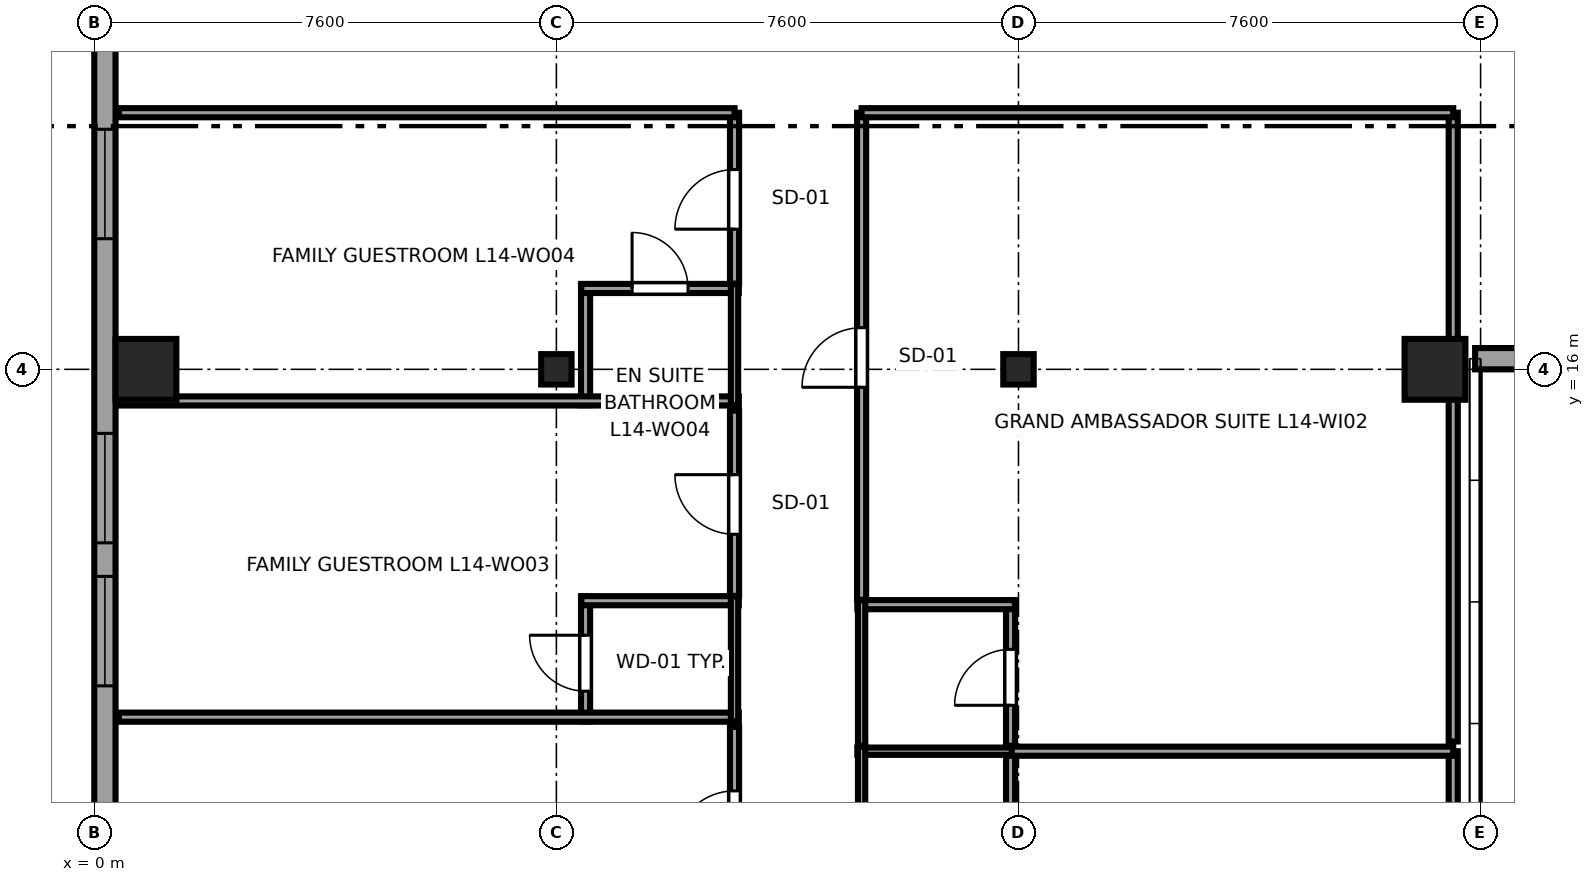
"""IFC4 building model, lengths in metres.
Left out: names, types, materials, properties, quantities, classifications, styles, units other than length and angle.
Written with IfcOpenShell. Run it as: python <this file> out.ifc"""

import sys

from ifc_helpers import new_model, si_unit, direction, frame, frame_2d, origin, origin_2d, place, context, subcontext, project, spatial, rectangle, i_section, extrude, source, transform, mapped, element, fill, save


model = new_model("IFC4")
c1 = context("Model", 3, precision=1e-05, world=origin(), true_north=direction((0.0, 1.0)))
c2 = subcontext(c1, "Body", "Model", "MODEL_VIEW")
j1 = project(units=[si_unit("LENGTHUNIT", "METRE"), si_unit("PLANEANGLEUNIT", "RADIAN")], contexts=[c1])
p1 = place(None, origin())
s1 = spatial("IfcSite", under=j1, at=p1, CompositionType="ELEMENT")
p2 = place(p1, origin())
s2 = spatial("IfcBuilding", under=s1, at=p2, CompositionType="ELEMENT")
p3 = place(p2, frame((0.0, 0.0, 60.4)))
s3 = spatial("IfcBuildingStorey", under=s2, at=p3, CompositionType="ELEMENT", Elevation=60.4)
m1 = source(origin(), c2, "Body", "SweptSolid", [
    extrude(rectangle(XDim=1.0, YDim=1.0, at=origin_2d()), origin(), (0.0, 0.0, 1.0), 3.55),
])
p4 = place(p3, frame((0.85, 16.0, 0.0), z_axis=(0.0, 0.0, 1.0), x_axis=(1.0, 0.0, 0.0)))
e1 = element("IfcColumn", 1, at=p4, inside=s3, PredefinedType="COLUMN", context=c2, shape_type="MappedRepresentation", body=[
    mapped(m1, transform((0.0, 0.0, 0.0), x_axis=(1.0, 0.0, 0.0), y_axis=(0.0, 1.0, 0.0), z_axis=(0.0, 0.0, 1.0), scale=1.0)),
])
m2 = source(origin(), c2, "Body", "SweptSolid", [
    extrude(i_section(OverallWidth=0.5, OverallDepth=0.5, WebThickness=0.028, FlangeThickness=0.045, at=origin_2d()), origin(), (0.0, 0.0, 1.0), 3.55),
])
for number, where, z_axis, x_axis in (
    (2, (7.6, 16.0, 0.0), (0.0, 0.0, 1.0), (1.0, 0.0, 0.0)),
    (3, (15.2, 16.0, 0.0), (0.0, 0.0, 1.0), (1.0, 0.0, 0.0)),
):
    element("IfcColumn", number, at=place(p3, frame(where, z_axis=z_axis, x_axis=x_axis)), inside=s3, PredefinedType="COLUMN", context=c2, shape_type="MappedRepresentation", body=[
        mapped(m2, transform((0.0, 0.0, 0.0), x_axis=(1.0, 0.0, 0.0), y_axis=(0.0, 1.0, 0.0), z_axis=(0.0, 0.0, 1.0), scale=1.0)),
    ])
p5 = place(p3, frame((22.05, 16.0, 0.0), z_axis=(0.0, 0.0, 1.0), x_axis=(1.0, 0.0, 0.0)))
e4 = element("IfcColumn", 4, at=p5, inside=s3, PredefinedType="COLUMN", context=c2, shape_type="MappedRepresentation", body=[
    mapped(m1, transform((0.0, 0.0, 0.0), x_axis=(1.0, 0.0, 0.0), y_axis=(0.0, 1.0, 0.0), z_axis=(0.0, 0.0, 1.0), scale=1.0)),
])
p6 = place(p3, frame((22.71, 16.175, 0.0), z_axis=(0.0, 0.0, 1.0), x_axis=(1.0, 0.0, 0.0)))
e5 = element("IfcWall", 5, at=p6, inside=s3, PredefinedType="SOLIDWALL", context=c2, shape_type="SweptSolid", body=[
    extrude(rectangle(XDim=11.58, YDim=0.35, at=frame_2d((5.79, 0.0))), origin(), (0.0, 0.0, 1.0), 2.748),
])
p7 = place(p6, frame((2.295, 0.0, 0.68)))
e6 = element("IfcOpeningElement", 6, at=p7, cuts=e5, PredefinedType="OPENING", context=c2, shape_type="SweptSolid", body=[
    extrude(rectangle(XDim=1.8, YDim=1.85, at=frame_2d((0.9, 0.925))), frame((0.0, 0.185, 0.0), z_axis=(0.0, -1.0, 0.0), x_axis=(1.0, 0.0, 0.0)), (0.0, 0.0, 1.0), 0.37),
])
p8 = place(p6, frame((7.485, 0.0, 0.68)))
e7 = element("IfcOpeningElement", 7, at=p8, cuts=e5, PredefinedType="OPENING", context=c2, shape_type="SweptSolid", body=[
    extrude(rectangle(XDim=1.8, YDim=1.85, at=frame_2d((0.9, 0.925))), frame((0.0, 0.185, 0.0), z_axis=(0.0, -1.0, 0.0), x_axis=(1.0, 0.0, 0.0)), (0.0, 0.0, 1.0), 0.37),
])
p9 = place(p3, frame((0.175, 41.383, 0.0), z_axis=(0.0, 0.0, 1.0), x_axis=(0.0, -1.0, 0.0)))
e8 = element("IfcWall", 8, at=p9, inside=s3, PredefinedType="SOLIDWALL", context=c2, shape_type="SweptSolid", body=[
    extrude(rectangle(XDim=36.766, YDim=0.35, at=frame_2d((18.383, 0.0))), origin(), (0.0, 0.0, 1.0), 3.37),
])
p10 = place(p9, frame((1.676, 0.0, 0.68)))
e9 = element("IfcOpeningElement", 9, at=p10, cuts=e8, PredefinedType="OPENING", context=c2, shape_type="SweptSolid", body=[
    extrude(rectangle(XDim=1.8, YDim=1.85, at=frame_2d((0.9, 0.925))), frame((0.0, 0.185, 0.0), z_axis=(0.0, -1.0, 0.0), x_axis=(1.0, 0.0, 0.0)), (0.0, 0.0, 1.0), 0.37),
])
p11 = place(p9, frame((4.578, 0.0, 0.68)))
e10 = element("IfcOpeningElement", 10, at=p11, cuts=e8, PredefinedType="OPENING", context=c2, shape_type="SweptSolid", body=[
    extrude(rectangle(XDim=1.8, YDim=1.85, at=frame_2d((0.9, 0.925))), frame((0.0, 0.185, 0.0), z_axis=(0.0, -1.0, 0.0), x_axis=(1.0, 0.0, 0.0)), (0.0, 0.0, 1.0), 0.37),
])
p12 = place(p9, frame((21.435, 0.0, 0.68)))
e11 = element("IfcOpeningElement", 11, at=p12, cuts=e8, PredefinedType="OPENING", context=c2, shape_type="SweptSolid", body=[
    extrude(rectangle(XDim=1.8, YDim=1.85, at=frame_2d((0.9, 0.925))), frame((0.0, 0.185, 0.0), z_axis=(0.0, -1.0, 0.0), x_axis=(1.0, 0.0, 0.0)), (0.0, 0.0, 1.0), 0.37),
])
p13 = place(p9, frame((26.436, 0.0, 0.68)))
e12 = element("IfcOpeningElement", 12, at=p13, cuts=e8, PredefinedType="OPENING", context=c2, shape_type="SweptSolid", body=[
    extrude(rectangle(XDim=1.8, YDim=1.85, at=frame_2d((0.9, 0.925))), frame((0.0, 0.185, 0.0), z_axis=(0.0, -1.0, 0.0), x_axis=(1.0, 0.0, 0.0)), (0.0, 0.0, 1.0), 0.37),
])
p14 = place(p9, frame((28.788, 0.0, 0.68)))
e13 = element("IfcOpeningElement", 13, at=p14, cuts=e8, PredefinedType="OPENING", context=c2, shape_type="SweptSolid", body=[
    extrude(rectangle(XDim=1.8, YDim=1.85, at=frame_2d((0.9, 0.925))), frame((0.0, 0.185, 0.0), z_axis=(0.0, -1.0, 0.0), x_axis=(1.0, 0.0, 0.0)), (0.0, 0.0, 1.0), 0.37),
])
p15 = place(p9, frame((33.893, 0.0, 0.62)))
e14 = element("IfcOpeningElement", 14, at=p15, cuts=e8, PredefinedType="OPENING", context=c2, shape_type="SweptSolid", body=[
    extrude(rectangle(XDim=1.5, YDim=1.55, at=frame_2d((0.75, 0.775))), frame((0.0, 0.185, 0.0), z_axis=(0.0, -1.0, 0.0), x_axis=(1.0, 0.0, 0.0)), (0.0, 0.0, 1.0), 0.37),
])
p16 = place(p9, frame((14.643, 0.0, 0.62)))
e15 = element("IfcOpeningElement", 15, at=p16, cuts=e8, PredefinedType="OPENING", context=c2, shape_type="SweptSolid", body=[
    extrude(rectangle(XDim=1.5, YDim=1.55, at=frame_2d((0.75, 0.775))), frame((0.0, 0.185, 0.0), z_axis=(0.0, -1.0, 0.0), x_axis=(1.0, 0.0, 0.0)), (0.0, 0.0, 1.0), 0.37),
])
p17 = place(p3, frame((8.08, 10.21, 0.0), z_axis=(0.0, 0.0, 1.0), x_axis=(0.0, 1.0, 0.0)))
e16 = element("IfcWall", 16, at=p17, inside=s3, PredefinedType="PARTITIONING", context=c2, shape_type="SweptSolid", body=[
    extrude(rectangle(XDim=2.055, YDim=0.15, at=frame_2d((1.027, 0.0))), origin(), (0.0, 0.0, 1.0), 3.37),
])
p18 = place(p17, frame((0.498, 0.0, 0.0)))
e17 = element("IfcOpeningElement", 17, at=p18, cuts=e16, PredefinedType="OPENING", context=c2, shape_type="SweptSolid", body=[
    extrude(rectangle(XDim=0.92, YDim=2.01, at=frame_2d((0.46, 1.005))), frame((0.0, 0.085, 0.0), z_axis=(0.0, -1.0, 0.0), x_axis=(1.0, 0.0, 0.0)), (0.0, 0.0, 1.0), 0.17),
])
p19 = place(p3, frame((0.405, 10.28, 0.0), z_axis=(0.0, 0.0, 1.0), x_axis=(1.0, 0.0, 0.0)))
e18 = element("IfcWall", 18, at=p19, inside=s3, PredefinedType="PARTITIONING", context=c2, shape_type="SweptSolid", body=[
    extrude(rectangle(XDim=10.195, YDim=0.15, at=frame_2d((5.098, 0.0))), origin(), (0.0, 0.0, 1.0), 3.37),
])
p20 = place(p3, frame((8.01, 12.195, 0.0), z_axis=(0.0, 0.0, 1.0), x_axis=(1.0, 0.0, 0.0)))
e19 = element("IfcWall", 19, at=p20, inside=s3, PredefinedType="PARTITIONING", context=c2, shape_type="SweptSolid", body=[
    extrude(rectangle(XDim=2.59, YDim=0.15, at=frame_2d((1.295, 0.0))), origin(), (0.0, 0.0, 1.0), 3.37),
])
p21 = place(p3, frame((10.53, 10.21, 0.0), z_axis=(0.0, 0.0, 1.0), x_axis=(0.0, 1.0, 0.0)))
e20 = element("IfcWall", 20, at=p21, inside=s3, PredefinedType="PLUMBINGWALL", context=c2, shape_type="SweptSolid", body=[
    extrude(rectangle(XDim=2.055, YDim=0.12, at=frame_2d((1.027, 0.0))), origin(), (0.0, 0.0, 1.0), 3.37),
])
p22 = place(p3, frame((8.08, 15.41, 0.0), z_axis=(0.0, 0.0, 1.0), x_axis=(0.0, 1.0, 0.0)))
e21 = element("IfcWall", 21, at=p22, inside=s3, PredefinedType="PARTITIONING", context=c2, shape_type="SweptSolid", body=[
    extrude(rectangle(XDim=1.99, YDim=0.15, at=frame_2d((0.995, 0.0))), origin(), (0.0, 0.0, 1.0), 3.37),
])
p23 = place(p3, frame((0.405, 15.48, 0.0), z_axis=(0.0, 0.0, 1.0), x_axis=(1.0, 0.0, 0.0)))
e22 = element("IfcWall", 22, at=p23, inside=s3, PredefinedType="PARTITIONING", context=c2, shape_type="SweptSolid", body=[
    extrude(rectangle(XDim=10.195, YDim=0.15, at=frame_2d((5.098, 0.0))), origin(), (0.0, 0.0, 1.0), 3.37),
])
p24 = place(p3, frame((8.01, 17.33, 0.0), z_axis=(0.0, 0.0, 1.0), x_axis=(1.0, 0.0, 0.0)))
e23 = element("IfcWall", 23, at=p24, inside=s3, PredefinedType="PARTITIONING", context=c2, shape_type="SweptSolid", body=[
    extrude(rectangle(XDim=2.59, YDim=0.15, at=frame_2d((1.295, 0.0))), origin(), (0.0, 0.0, 1.0), 3.37),
])
p25 = place(p24, frame((0.835, 0.0, 0.0)))
e24 = element("IfcOpeningElement", 24, at=p25, cuts=e23, PredefinedType="OPENING", context=c2, shape_type="SweptSolid", body=[
    extrude(rectangle(XDim=0.92, YDim=2.01, at=frame_2d((0.46, 1.005))), frame((0.0, 0.085, 0.0), z_axis=(0.0, -1.0, 0.0), x_axis=(1.0, 0.0, 0.0)), (0.0, 0.0, 1.0), 0.17),
])
p26 = place(p3, frame((10.53, 15.41, 0.0), z_axis=(0.0, 0.0, 1.0), x_axis=(0.0, 1.0, 0.0)))
e25 = element("IfcWall", 25, at=p26, inside=s3, PredefinedType="PLUMBINGWALL", context=c2, shape_type="SweptSolid", body=[
    extrude(rectangle(XDim=1.99, YDim=0.12, at=frame_2d((0.995, 0.0))), origin(), (0.0, 0.0, 1.0), 3.37),
])
p27 = place(p3, frame((15.07, 7.4, 0.0), z_axis=(0.0, 0.0, 1.0), x_axis=(0.0, 1.0, 0.0)))
e26 = element("IfcWall", 26, at=p27, inside=s3, PredefinedType="PARTITIONING", context=c2, shape_type="SweptSolid", body=[
    extrude(rectangle(XDim=2.39, YDim=0.15, at=frame_2d((1.195, 0.0))), origin(), (0.0, 0.0, 1.0), 2.827),
])
p28 = place(p3, frame((12.55, 9.72, 0.0), z_axis=(0.0, 0.0, 1.0), x_axis=(1.0, 0.0, 0.0)))
e27 = element("IfcWall", 27, at=p28, inside=s3, PredefinedType="PLUMBINGWALL", context=c2, shape_type="SweptSolid", body=[
    extrude(rectangle(XDim=2.59, YDim=0.12, at=frame_2d((1.295, 0.0))), origin(), (0.0, 0.0, 1.0), 3.37),
])
p29 = place(p3, frame((12.62, 7.4, 0.0), z_axis=(0.0, 0.0, 1.0), x_axis=(0.0, 1.0, 0.0)))
e28 = element("IfcWall", 28, at=p29, inside=s3, PredefinedType="PLUMBINGWALL", context=c2, shape_type="SweptSolid", body=[
    extrude(rectangle(XDim=2.39, YDim=0.12, at=frame_2d((1.195, 0.0))), origin(), (0.0, 0.0, 1.0), 3.37),
])
p30 = place(p3, frame((15.07, 9.81, 0.0), z_axis=(0.0, 0.0, 1.0), x_axis=(0.0, 1.0, 0.0)))
e29 = element("IfcWall", 29, at=p30, inside=s3, PredefinedType="PARTITIONING", context=c2, shape_type="SweptSolid", body=[
    extrude(rectangle(XDim=2.39, YDim=0.15, at=frame_2d((1.195, 0.0))), origin(), (0.0, 0.0, 1.0), 2.827),
])
p31 = place(p30, frame((0.665, 0.0, 0.0)))
e30 = element("IfcOpeningElement", 30, at=p31, cuts=e29, PredefinedType="OPENING", context=c2, shape_type="SweptSolid", body=[
    extrude(rectangle(XDim=0.92, YDim=2.01, at=frame_2d((0.46, 1.005))), frame((0.0, 0.085, 0.0), z_axis=(0.0, -1.0, 0.0), x_axis=(1.0, 0.0, 0.0)), (0.0, 0.0, 1.0), 0.17),
])
p32 = place(p3, frame((12.55, 12.13, 0.0), z_axis=(0.0, 0.0, 1.0), x_axis=(1.0, 0.0, 0.0)))
e31 = element("IfcWall", 31, at=p32, inside=s3, PredefinedType="PARTITIONING", context=c2, shape_type="SweptSolid", body=[
    extrude(rectangle(XDim=2.59, YDim=0.15, at=frame_2d((1.295, 0.0))), origin(), (0.0, 0.0, 1.0), 3.37),
])
p33 = place(p3, frame((12.62, 9.81, 0.0), z_axis=(0.0, 0.0, 1.0), x_axis=(0.0, 1.0, 0.0)))
e32 = element("IfcWall", 32, at=p33, inside=s3, PredefinedType="PLUMBINGWALL", context=c2, shape_type="SweptSolid", body=[
    extrude(rectangle(XDim=2.39, YDim=0.12, at=frame_2d((1.195, 0.0))), origin(), (0.0, 0.0, 1.0), 3.37),
])
p34 = place(p3, frame((10.53, 7.075, 0.0), z_axis=(0.0, 0.0, 1.0), x_axis=(0.0, 1.0, 0.0)))
e33 = element("IfcWall", 33, at=p34, inside=s3, PredefinedType="PARTITIONING", context=c2, shape_type="SweptSolid", body=[
    extrude(rectangle(XDim=3.045, YDim=0.15, at=frame_2d((1.522, 0.0))), origin(), (0.0, 0.0, 1.0), 3.37),
])
p35 = place(p34, frame((1.012, 0.0, 0.0)))
e34 = element("IfcOpeningElement", 34, at=p35, cuts=e33, PredefinedType="OPENING", context=c2, shape_type="SweptSolid", body=[
    extrude(rectangle(XDim=0.98, YDim=2.12, at=frame_2d((0.49, 1.06))), frame((0.0, 0.085, 0.0), z_axis=(0.0, -1.0, 0.0), x_axis=(1.0, 0.0, 0.0)), (0.0, 0.0, 1.0), 0.17),
])
p36 = place(p3, frame((10.53, 12.275, 0.0), z_axis=(0.0, 0.0, 1.0), x_axis=(0.0, 1.0, 0.0)))
e35 = element("IfcWall", 35, at=p36, inside=s3, PredefinedType="PARTITIONING", context=c2, shape_type="SweptSolid", body=[
    extrude(rectangle(XDim=3.045, YDim=0.15, at=frame_2d((1.522, 0.0))), origin(), (0.0, 0.0, 1.0), 3.37),
])
p37 = place(p36, frame((1.012, 0.0, 0.0)))
e36 = element("IfcOpeningElement", 36, at=p37, cuts=e35, PredefinedType="OPENING", context=c2, shape_type="SweptSolid", body=[
    extrude(rectangle(XDim=0.98, YDim=2.12, at=frame_2d((0.49, 1.06))), frame((0.0, 0.085, 0.0), z_axis=(0.0, -1.0, 0.0), x_axis=(1.0, 0.0, 0.0)), (0.0, 0.0, 1.0), 0.17),
])
p38 = place(p3, frame((10.53, 17.41, 0.0), z_axis=(0.0, 0.0, 1.0), x_axis=(0.0, 1.0, 0.0)))
e37 = element("IfcWall", 37, at=p38, inside=s3, PredefinedType="PARTITIONING", context=c2, shape_type="SweptSolid", body=[
    extrude(rectangle(XDim=2.81, YDim=0.15, at=frame_2d((1.405, 0.0))), origin(), (0.0, 0.0, 1.0), 3.37),
])
p39 = place(p38, frame((0.895, 0.0, 0.0)))
e38 = element("IfcOpeningElement", 38, at=p39, cuts=e37, PredefinedType="OPENING", context=c2, shape_type="SweptSolid", body=[
    extrude(rectangle(XDim=0.98, YDim=2.12, at=frame_2d((0.49, 1.06))), frame((0.0, 0.085, 0.0), z_axis=(0.0, -1.0, 0.0), x_axis=(1.0, 0.0, 0.0)), (0.0, 0.0, 1.0), 0.17),
])
p40 = place(p3, frame((0.405, 20.22, 0.0), z_axis=(0.0, 0.0, 1.0), x_axis=(1.0, 0.0, 0.0)))
e39 = element("IfcWall", 39, at=p40, inside=s3, PredefinedType="PARTITIONING", context=c2, shape_type="SweptSolid", body=[
    extrude(rectangle(XDim=10.125, YDim=0.15, at=frame_2d((5.062, 0.0))), origin(), (0.0, 0.0, 1.0), 3.37),
])
p41 = place(p3, frame((22.35, 0.405, 0.0), z_axis=(0.0, 0.0, 1.0), x_axis=(0.0, 1.0, 0.0)))
e40 = element("IfcWall", 40, at=p41, inside=s3, PredefinedType="PARTITIONING", context=c2, shape_type="SweptSolid", body=[
    extrude(rectangle(XDim=9.315, YDim=0.15, at=frame_2d((4.657, 0.0))), origin(), (0.0, 0.0, 1.0), 3.37),
])
p42 = place(p3, frame((15.09, 9.72, 0.0), z_axis=(0.0, 0.0, 1.0), x_axis=(1.0, 0.0, 0.0)))
e41 = element("IfcWall", 41, at=p42, inside=s3, PredefinedType="PARTITIONING", context=c2, shape_type="SweptSolid", body=[
    extrude(rectangle(XDim=7.26, YDim=0.15, at=frame_2d((3.63, 0.0))), origin(), (0.0, 0.0, 1.0), 3.37),
])
p43 = place(p3, frame((12.62, 12.21, 0.0), z_axis=(0.0, 0.0, 1.0), x_axis=(0.0, 1.0, 0.0)))
e42 = element("IfcWall", 42, at=p43, inside=s3, PredefinedType="PARTITIONING", context=c2, shape_type="SweptSolid", body=[
    extrude(rectangle(XDim=8.01, YDim=0.15, at=frame_2d((4.005, 0.0))), origin(), (0.0, 0.0, 1.0), 3.37),
])
p44 = place(p43, frame((3.495, 0.0, 0.0)))
e43 = element("IfcOpeningElement", 43, at=p44, cuts=e42, PredefinedType="OPENING", context=c2, shape_type="SweptSolid", body=[
    extrude(rectangle(XDim=0.98, YDim=2.12, at=frame_2d((0.49, 1.06))), frame((0.0, 0.085, 0.0), z_axis=(0.0, -1.0, 0.0), x_axis=(1.0, 0.0, 0.0)), (0.0, 0.0, 1.0), 0.17),
])
p45 = place(p3, frame((22.35, 9.88, 0.0), z_axis=(0.0, 0.0, 1.0), x_axis=(0.0, 1.0, 0.0)))
e44 = element("IfcWall", 44, at=p45, inside=s3, PredefinedType="PARTITIONING", context=c2, shape_type="SweptSolid", body=[
    extrude(rectangle(XDim=10.34, YDim=0.15, at=frame_2d((5.17, 0.0))), origin(), (0.0, 0.0, 1.0), 3.37),
])
p46 = place(p3, frame((12.62, 20.22, 0.0), z_axis=(0.0, 0.0, 1.0), x_axis=(1.0, 0.0, 0.0)))
e45 = element("IfcWall", 45, at=p46, inside=s3, PredefinedType="PARTITIONING", context=c2, shape_type="SweptSolid", body=[
    extrude(rectangle(XDim=9.73, YDim=0.15, at=frame_2d((4.865, 0.0))), origin(), (0.0, 0.0, 1.0), 2.954),
])
m3 = source(origin(), c2, "Body", "SweptSolid", [
    extrude(rectangle(XDim=1.8, YDim=1.85, at=frame_2d((0.9, 0.925))), frame((0.0, 0.09, 0.0), z_axis=(0.0, -1.0, 0.0), x_axis=(1.0, 0.0, 0.0)), (0.0, 0.0, 1.0), 0.06),
])
p47 = place(p12, origin())
e46 = element("IfcWindow", 46, at=p47, inside=s3, PartitioningType="TRIPLE_PANEL_HORIZONTAL", PredefinedType="WINDOW", context=c2, shape_type="MappedRepresentation", body=[
    mapped(m3, transform((0.0, 0.0, 0.0), x_axis=(1.0, 0.0, 0.0), y_axis=(0.0, 1.0, 0.0), z_axis=(0.0, 0.0, 1.0), scale=1.0)),
])
fill(e11, e46)
p48 = place(p13, origin())
e47 = element("IfcWindow", 47, at=p48, inside=s3, PartitioningType="TRIPLE_PANEL_HORIZONTAL", PredefinedType="WINDOW", context=c2, shape_type="MappedRepresentation", body=[
    mapped(m3, transform((0.0, 0.0, 0.0), x_axis=(1.0, 0.0, 0.0), y_axis=(0.0, 1.0, 0.0), z_axis=(0.0, 0.0, 1.0), scale=1.0)),
])
fill(e12, e47)
p49 = place(p14, origin())
e48 = element("IfcWindow", 48, at=p49, inside=s3, PartitioningType="TRIPLE_PANEL_HORIZONTAL", PredefinedType="WINDOW", context=c2, shape_type="MappedRepresentation", body=[
    mapped(m3, transform((0.0, 0.0, 0.0), x_axis=(1.0, 0.0, 0.0), y_axis=(0.0, 1.0, 0.0), z_axis=(0.0, 0.0, 1.0), scale=1.0)),
])
fill(e13, e48)
m4 = source(origin(), c2, "Body", "SweptSolid", [
    extrude(rectangle(XDim=0.92, YDim=2.01, at=frame_2d((0.46, 1.005))), frame((0.0, 0.025, 0.0), z_axis=(0.0, -1.0, 0.0), x_axis=(1.0, 0.0, 0.0)), (0.0, 0.0, 1.0), 0.05),
])
p50 = place(p18, origin())
e49 = element("IfcDoor", 49, at=p50, inside=s3, OperationType="SINGLE_SWING_RIGHT", PredefinedType="DOOR", context=c2, shape_type="MappedRepresentation", body=[
    mapped(m4, transform((0.0, 0.0, 0.0), x_axis=(1.0, 0.0, 0.0), y_axis=(0.0, 1.0, 0.0), z_axis=(0.0, 0.0, 1.0), scale=1.0)),
])
fill(e17, e49)
p51 = place(p25, origin())
e50 = element("IfcDoor", 50, at=p51, inside=s3, OperationType="SINGLE_SWING_LEFT", PredefinedType="DOOR", context=c2, shape_type="MappedRepresentation", body=[
    mapped(m4, transform((0.0, 0.0, 0.0), x_axis=(1.0, 0.0, 0.0), y_axis=(0.0, 1.0, 0.0), z_axis=(0.0, 0.0, 1.0), scale=1.0)),
])
fill(e24, e50)
p52 = place(p31, origin())
e51 = element("IfcDoor", 51, at=p52, inside=s3, OperationType="SINGLE_SWING_LEFT", PredefinedType="DOOR", context=c2, shape_type="MappedRepresentation", body=[
    mapped(m4, transform((0.0, 0.0, 0.0), x_axis=(1.0, 0.0, 0.0), y_axis=(0.0, 1.0, 0.0), z_axis=(0.0, 0.0, 1.0), scale=1.0)),
])
fill(e30, e51)
m5 = source(origin(), c2, "Body", "SweptSolid", [
    extrude(rectangle(XDim=0.98, YDim=2.12, at=frame_2d((0.49, 1.06))), frame((0.0, 0.025, 0.0), z_axis=(0.0, -1.0, 0.0), x_axis=(1.0, 0.0, 0.0)), (0.0, 0.0, 1.0), 0.05),
])
p53 = place(p35, origin())
e52 = element("IfcDoor", 52, at=p53, inside=s3, OperationType="SINGLE_SWING_LEFT", PredefinedType="DOOR", context=c2, shape_type="MappedRepresentation", body=[
    mapped(m5, transform((0.0, 0.0, 0.0), x_axis=(1.0, 0.0, 0.0), y_axis=(0.0, 1.0, 0.0), z_axis=(0.0, 0.0, 1.0), scale=1.0)),
])
fill(e34, e52)
p54 = place(p37, origin())
e53 = element("IfcDoor", 53, at=p54, inside=s3, OperationType="SINGLE_SWING_RIGHT", PredefinedType="DOOR", context=c2, shape_type="MappedRepresentation", body=[
    mapped(m5, transform((0.0, 0.0, 0.0), x_axis=(1.0, 0.0, 0.0), y_axis=(0.0, 1.0, 0.0), z_axis=(0.0, 0.0, 1.0), scale=1.0)),
])
fill(e36, e53)
p55 = place(p39, origin())
e54 = element("IfcDoor", 54, at=p55, inside=s3, OperationType="SINGLE_SWING_LEFT", PredefinedType="DOOR", context=c2, shape_type="MappedRepresentation", body=[
    mapped(m5, transform((0.0, 0.0, 0.0), x_axis=(1.0, 0.0, 0.0), y_axis=(0.0, 1.0, 0.0), z_axis=(0.0, 0.0, 1.0), scale=1.0)),
])
fill(e38, e54)
p56 = place(p44, origin())
e55 = element("IfcDoor", 55, at=p56, inside=s3, OperationType="SINGLE_SWING_LEFT", PredefinedType="DOOR", context=c2, shape_type="MappedRepresentation", body=[
    mapped(m5, transform((0.0, 0.0, 0.0), x_axis=(1.0, 0.0, 0.0), y_axis=(0.0, 1.0, 0.0), z_axis=(0.0, 0.0, 1.0), scale=1.0)),
])
fill(e43, e55)
save(model, sys.argv[1])
